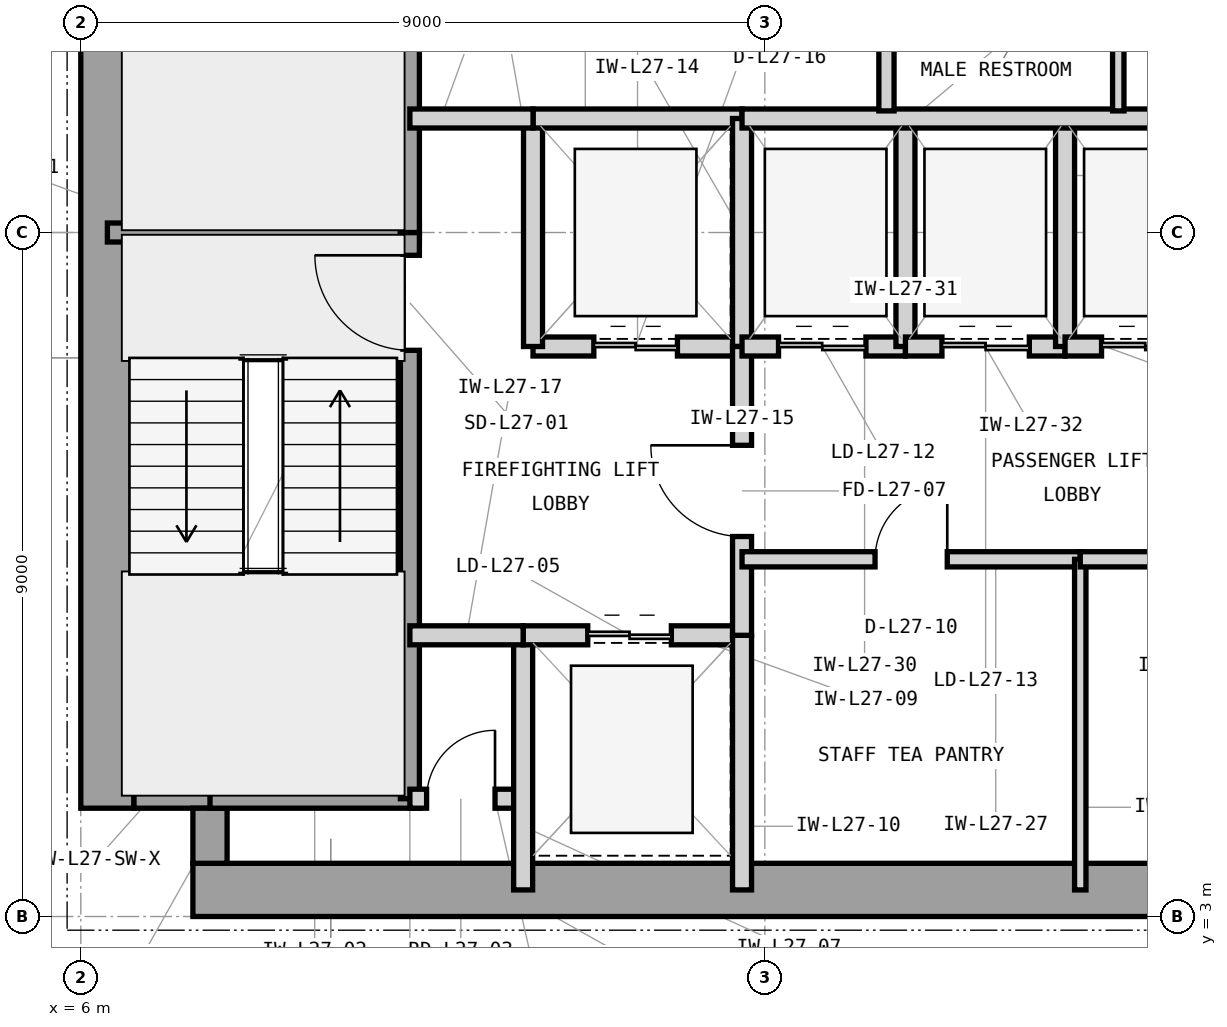
"""IFC4 building model, lengths in metres.
Left out: names, types, materials, properties, quantities, classifications, styles, units other than length and angle.
Written with IfcOpenShell. Run it as: python <this file> out.ifc"""

import sys

from ifc_helpers import new_model, si_unit, direction, frame, frame_2d, origin, place, context, subcontext, project, spatial, rectangle, extrude, element, fill, save


model = new_model("IFC4")
c1 = context("Model", 3, precision=1e-05, world=origin(), true_north=direction((0.0, 1.0)))
c2 = subcontext(c1, "Body", "Model", "MODEL_VIEW")
j1 = project(units=[si_unit("LENGTHUNIT", "METRE"), si_unit("PLANEANGLEUNIT", "RADIAN")], contexts=[c1])
p1 = place(None, origin())
s1 = spatial("IfcSite", under=j1, at=p1, CompositionType="ELEMENT")
p2 = place(p1, origin())
s2 = spatial("IfcBuilding", under=s1, at=p2, CompositionType="ELEMENT")
p3 = place(p2, frame((0.0, 0.0, 116.7)))
s3 = spatial("IfcBuildingStorey", under=s2, at=p3, CompositionType="ELEMENT", Elevation=116.7)
p4 = place(p3, frame((7.475, 3.35, 0.0), z_axis=(0.0, 0.0, 1.0), x_axis=(1.0, 0.0, 0.0)))
e1 = element("IfcWall", 1, at=p4, inside=s3, PredefinedType="SHEAR", context=c2, shape_type="SweptSolid", body=[
    extrude(rectangle(XDim=16.525, YDim=0.7, at=frame_2d((8.262, 0.0))), origin(), (0.0, 0.0, 1.0), 3.9),
])
p5 = place(p3, frame((6.35, 4.425, 0.0), z_axis=(0.0, 0.0, 1.0), x_axis=(0.0, 1.0, 0.0)))
e2 = element("IfcWall", 2, at=p5, inside=s3, PredefinedType="SHEAR", context=c2, shape_type="SweptSolid", body=[
    extrude(rectangle(XDim=15.15, YDim=0.7, at=frame_2d((7.575, 0.0))), origin(), (0.0, 0.0, 1.0), 3.9),
])
p6 = place(p3, frame((6.7, 4.65, 0.0), z_axis=(0.0, 0.0, 1.0), x_axis=(1.0, 0.0, 0.0)))
e3 = element("IfcWall", 3, at=p6, inside=s3, PredefinedType="SHEAR", context=c2, shape_type="SweptSolid", body=[
    extrude(rectangle(XDim=1.225, YDim=0.45, at=frame_2d((0.613, 0.0))), origin(), (0.0, 0.0, 1.0), 3.9),
])
p7 = place(p3, frame((7.7, 3.7, 0.0), z_axis=(0.0, 0.0, 1.0), x_axis=(0.0, 1.0, 0.0)))
e4 = element("IfcWall", 4, at=p7, inside=s3, PredefinedType="SHEAR", context=c2, shape_type="SweptSolid", body=[
    extrude(rectangle(XDim=0.725, YDim=0.45, at=frame_2d((0.363, 0.0))), origin(), (0.0, 0.0, 1.0), 3.9),
])
p8 = place(p3, frame((6.35, 12.0, 0.0), z_axis=(0.0, 0.0, 1.0), x_axis=(1.0, 0.0, 0.0)))
e5 = element("IfcWall", 5, at=p8, inside=s3, PredefinedType="SHEAR", context=c2, shape_type="SweptSolid", body=[
    extrude(rectangle(XDim=4.105, YDim=0.25, at=frame_2d((2.052, 0.0))), origin(), (0.0, 0.0, 1.0), 3.9),
])
p9 = place(p3, frame((7.7, 4.55, 0.0), z_axis=(0.0, 0.0, 1.0), x_axis=(1.0, 0.0, 0.0)))
e6 = element("IfcWall", 6, at=p9, inside=s3, PredefinedType="SHEAR", context=c2, shape_type="SweptSolid", body=[
    extrude(rectangle(XDim=2.755, YDim=0.25, at=frame_2d((1.377, 0.0))), origin(), (0.0, 0.0, 1.0), 3.9),
])
p10 = place(p3, frame((10.33, 4.55, 0.0), z_axis=(0.0, 0.0, 1.0), x_axis=(0.0, 1.0, 0.0)))
e7 = element("IfcWall", 7, at=p10, inside=s3, PredefinedType="SHEAR", context=c2, shape_type="SweptSolid", body=[
    extrude(rectangle(XDim=7.45, YDim=0.25, at=frame_2d((3.725, 0.0))), origin(), (0.0, 0.0, 1.0), 3.9),
])
p11 = place(p10, frame((5.9, 0.0, 0.0)))
e8 = element("IfcOpeningElement", 8, at=p11, cuts=e7, PredefinedType="OPENING", context=c2, shape_type="SweptSolid", body=[
    extrude(rectangle(XDim=1.25, YDim=2.2, at=frame_2d((0.625, 1.1))), frame((0.0, 0.135, 0.0), z_axis=(0.0, -1.0, 0.0), x_axis=(1.0, 0.0, 0.0)), (0.0, 0.0, 1.0), 0.27),
])
p12 = place(p3, frame((10.33, 12.0, 0.0), z_axis=(0.0, 0.0, 1.0), x_axis=(0.0, 1.0, 0.0)))
e9 = element("IfcWall", 9, at=p12, inside=s3, PredefinedType="SHEAR", context=c2, shape_type="SweptSolid", body=[
    extrude(rectangle(XDim=7.45, YDim=0.25, at=frame_2d((3.725, 0.0))), origin(), (0.0, 0.0, 1.0), 3.9),
])
p13 = place(p12, frame((5.85, 0.0, 0.0)))
e10 = element("IfcOpeningElement", 10, at=p13, cuts=e9, PredefinedType="OPENING", context=c2, shape_type="SweptSolid", body=[
    extrude(rectangle(XDim=1.25, YDim=2.2, at=frame_2d((0.625, 1.1))), frame((0.0, 0.135, 0.0), z_axis=(0.0, -1.0, 0.0), x_axis=(1.0, 0.0, 0.0)), (0.0, 0.0, 1.0), 0.27),
])
p14 = place(p3, frame((10.33, 4.55, 0.0), z_axis=(0.0, 0.0, 1.0), x_axis=(1.0, 0.0, 0.0)))
e11 = element("IfcWall", 11, at=p14, inside=s3, PredefinedType="PARTITIONING", context=c2, shape_type="SweptSolid", body=[
    extrude(rectangle(XDim=1.49, YDim=0.25, at=frame_2d((0.745, 0.0))), origin(), (0.0, 0.0, 1.0), 3.69),
])
p15 = place(p14, frame((0.22, 0.0, 0.0)))
e12 = element("IfcOpeningElement", 12, at=p15, cuts=e11, PredefinedType="OPENING", context=c2, shape_type="SweptSolid", body=[
    extrude(rectangle(XDim=0.9, YDim=2.1, at=frame_2d((0.45, 1.05))), frame((0.0, 0.135, 0.0), z_axis=(0.0, -1.0, 0.0), x_axis=(1.0, 0.0, 0.0)), (0.0, 0.0, 1.0), 0.27),
])
p16 = place(p3, frame((11.82, 3.35, 0.0), z_axis=(0.0, 0.0, 1.0), x_axis=(0.0, 1.0, 0.0)))
e13 = element("IfcWall", 13, at=p16, inside=s3, PredefinedType="PARTITIONING", context=c2, shape_type="SweptSolid", body=[
    extrude(rectangle(XDim=3.35, YDim=0.25, at=frame_2d((1.675, 0.0))), origin(), (0.0, 0.0, 1.0), 3.69),
])
p17 = place(p3, frame((11.82, 6.7, 0.0), z_axis=(0.0, 0.0, 1.0), x_axis=(1.0, 0.0, 0.0)))
e14 = element("IfcWall", 14, at=p17, inside=s3, PredefinedType="PARTITIONING", context=c2, shape_type="SweptSolid", body=[
    extrude(rectangle(XDim=2.88, YDim=0.25, at=frame_2d((1.44, 0.0))), origin(), (0.0, 0.0, 1.0), 3.227),
])
p18 = place(p17, frame((0.85, 0.0, 0.0)))
e15 = element("IfcOpeningElement", 15, at=p18, cuts=e14, PredefinedType="OPENING", context=c2, shape_type="SweptSolid", body=[
    extrude(rectangle(XDim=1.1, YDim=2.25, at=frame_2d((0.55, 1.125))), frame((0.0, 0.135, 0.0), z_axis=(0.0, -1.0, 0.0), x_axis=(1.0, 0.0, 0.0)), (0.0, 0.0, 1.0), 0.27),
])
p19 = place(p3, frame((14.7, 3.35, 0.0), z_axis=(0.0, 0.0, 1.0), x_axis=(0.0, 1.0, 0.0)))
e16 = element("IfcWall", 16, at=p19, inside=s3, PredefinedType="PARTITIONING", context=c2, shape_type="SweptSolid", body=[
    extrude(rectangle(XDim=3.35, YDim=0.25, at=frame_2d((1.675, 0.0))), origin(), (0.0, 0.0, 1.0), 3.69),
])
p20 = place(p3, frame((11.95, 10.5, 0.0), z_axis=(0.0, 0.0, 1.0), x_axis=(1.0, 0.0, 0.0)))
e17 = element("IfcWall", 17, at=p20, inside=s3, PredefinedType="PARTITIONING", context=c2, shape_type="SweptSolid", body=[
    extrude(rectangle(XDim=2.75, YDim=0.25, at=frame_2d((1.375, 0.0))), origin(), (0.0, 0.0, 1.0), 3.227),
])
p21 = place(p20, frame((0.8, 0.0, 0.0)))
e18 = element("IfcOpeningElement", 18, at=p21, cuts=e17, PredefinedType="OPENING", context=c2, shape_type="SweptSolid", body=[
    extrude(rectangle(XDim=1.1, YDim=2.25, at=frame_2d((0.55, 1.125))), frame((0.0, 0.135, 0.0), z_axis=(0.0, -1.0, 0.0), x_axis=(1.0, 0.0, 0.0)), (0.0, 0.0, 1.0), 0.27),
])
p22 = place(p3, frame((11.95, 10.5, 0.0), z_axis=(0.0, 0.0, 1.0), x_axis=(0.0, 1.0, 0.0)))
e19 = element("IfcWall", 19, at=p22, inside=s3, PredefinedType="PARTITIONING", context=c2, shape_type="SweptSolid", body=[
    extrude(rectangle(XDim=3.0, YDim=0.25, at=frame_2d((1.5, 0.0))), origin(), (0.0, 0.0, 1.0), 3.69),
])
p23 = place(p3, frame((11.95, 13.5, 0.0), z_axis=(0.0, 0.0, 1.0), x_axis=(1.0, 0.0, 0.0)))
e20 = element("IfcWall", 20, at=p23, inside=s3, PredefinedType="PARTITIONING", context=c2, shape_type="SweptSolid", body=[
    extrude(rectangle(XDim=2.75, YDim=0.25, at=frame_2d((1.375, 0.0))), origin(), (0.0, 0.0, 1.0), 3.227),
])
p24 = place(p3, frame((14.7, 10.5, 0.0), z_axis=(0.0, 0.0, 1.0), x_axis=(0.0, 1.0, 0.0)))
e21 = element("IfcWall", 21, at=p24, inside=s3, PredefinedType="PARTITIONING", context=c2, shape_type="SweptSolid", body=[
    extrude(rectangle(XDim=3.0, YDim=0.25, at=frame_2d((1.5, 0.0))), origin(), (0.0, 0.0, 1.0), 3.69),
])
p25 = place(p3, frame((14.7, 6.7, 0.0), z_axis=(0.0, 0.0, 1.0), x_axis=(0.0, 1.0, 0.0)))
e22 = element("IfcWall", 22, at=p25, inside=s3, PredefinedType="PARTITIONING", context=c2, shape_type="SweptSolid", body=[
    extrude(rectangle(XDim=3.8, YDim=0.25, at=frame_2d((1.9, 0.0))), origin(), (0.0, 0.0, 1.0), 3.69),
])
p26 = place(p25, frame((1.3, 0.0, 0.0)))
e23 = element("IfcOpeningElement", 23, at=p26, cuts=e22, PredefinedType="OPENING", context=c2, shape_type="SweptSolid", body=[
    extrude(rectangle(XDim=1.2, YDim=2.2, at=frame_2d((0.6, 1.1))), frame((0.0, 0.135, 0.0), z_axis=(0.0, -1.0, 0.0), x_axis=(1.0, 0.0, 0.0)), (0.0, 0.0, 1.0), 0.27),
])
p27 = place(p3, frame((10.33, 13.5, 0.0), z_axis=(0.0, 0.0, 1.0), x_axis=(1.0, 0.0, 0.0)))
e24 = element("IfcWall", 24, at=p27, inside=s3, PredefinedType="PARTITIONING", context=c2, shape_type="SweptSolid", body=[
    extrude(rectangle(XDim=1.62, YDim=0.25, at=frame_2d((0.81, 0.0))), origin(), (0.0, 0.0, 1.0), 3.227),
])
p28 = place(p3, frame((10.33, 6.7, 0.0), z_axis=(0.0, 0.0, 1.0), x_axis=(1.0, 0.0, 0.0)))
e25 = element("IfcWall", 25, at=p28, inside=s3, PredefinedType="PARTITIONING", context=c2, shape_type="SweptSolid", body=[
    extrude(rectangle(XDim=1.49, YDim=0.25, at=frame_2d((0.745, 0.0))), origin(), (0.0, 0.0, 1.0), 3.227),
])
p29 = place(p3, frame((14.7, 7.7, 0.0), z_axis=(0.0, 0.0, 1.0), x_axis=(1.0, 0.0, 0.0)))
e26 = element("IfcWall", 26, at=p29, inside=s3, PredefinedType="PARTITIONING", context=c2, shape_type="SweptSolid", body=[
    extrude(rectangle(XDim=4.45, YDim=0.2, at=frame_2d((2.225, 0.0))), origin(), (0.0, 0.0, 1.0), 3.69),
])
p30 = place(p29, frame((1.75, 0.0, 0.0)))
e27 = element("IfcOpeningElement", 27, at=p30, cuts=e26, PredefinedType="OPENING", context=c2, shape_type="SweptSolid", body=[
    extrude(rectangle(XDim=0.95, YDim=2.1, at=frame_2d((0.475, 1.05))), frame((0.0, 0.11, 0.0), z_axis=(0.0, -1.0, 0.0), x_axis=(1.0, 0.0, 0.0)), (0.0, 0.0, 1.0), 0.22),
])
p31 = place(p3, frame((19.15, 3.35, 0.0), z_axis=(0.0, 0.0, 1.0), x_axis=(0.0, 1.0, 0.0)))
e28 = element("IfcWall", 28, at=p31, inside=s3, PredefinedType="PARTITIONING", context=c2, shape_type="SweptSolid", body=[
    extrude(rectangle(XDim=4.35, YDim=0.15, at=frame_2d((2.175, 0.0))), origin(), (0.0, 0.0, 1.0), 3.69),
])
p32 = place(p3, frame((19.15, 7.7, 0.0), z_axis=(0.0, 0.0, 1.0), x_axis=(1.0, 0.0, 0.0)))
e29 = element("IfcWall", 29, at=p32, inside=s3, PredefinedType="PARTITIONING", context=c2, shape_type="SweptSolid", body=[
    extrude(rectangle(XDim=4.5, YDim=0.2, at=frame_2d((2.25, 0.0))), origin(), (0.0, 0.0, 1.0), 3.69),
])
p33 = place(p32, frame((1.75, 0.0, 0.0)))
e30 = element("IfcOpeningElement", 30, at=p33, cuts=e29, PredefinedType="OPENING", context=c2, shape_type="SweptSolid", body=[
    extrude(rectangle(XDim=1.0, YDim=2.15, at=frame_2d((0.5, 1.075))), frame((0.0, 0.11, 0.0), z_axis=(0.0, -1.0, 0.0), x_axis=(1.0, 0.0, 0.0)), (0.0, 0.0, 1.0), 0.22),
])
p34 = place(p3, frame((14.7, 10.5, 0.0), z_axis=(0.0, 0.0, 1.0), x_axis=(1.0, 0.0, 0.0)))
e31 = element("IfcWall", 31, at=p34, inside=s3, PredefinedType="PARTITIONING", context=c2, shape_type="SweptSolid", body=[
    extrude(rectangle(XDim=2.15, YDim=0.25, at=frame_2d((1.075, 0.0))), origin(), (0.0, 0.0, 1.0), 3.227),
])
p35 = place(p34, frame((0.48, 0.0, 0.0)))
e32 = element("IfcOpeningElement", 32, at=p35, cuts=e31, PredefinedType="OPENING", context=c2, shape_type="SweptSolid", body=[
    extrude(rectangle(XDim=1.15, YDim=2.25, at=frame_2d((0.575, 1.125))), frame((0.0, 0.135, 0.0), z_axis=(0.0, -1.0, 0.0), x_axis=(1.0, 0.0, 0.0)), (0.0, 0.0, 1.0), 0.27),
])
p36 = place(p3, frame((16.85, 10.5, 0.0), z_axis=(0.0, 0.0, 1.0), x_axis=(0.0, 1.0, 0.0)))
e33 = element("IfcWall", 33, at=p36, inside=s3, PredefinedType="PARTITIONING", context=c2, shape_type="SweptSolid", body=[
    extrude(rectangle(XDim=3.0, YDim=0.25, at=frame_2d((1.5, 0.0))), origin(), (0.0, 0.0, 1.0), 3.69),
])
p37 = place(p3, frame((16.85, 10.5, 0.0), z_axis=(0.0, 0.0, 1.0), x_axis=(1.0, 0.0, 0.0)))
e34 = element("IfcWall", 34, at=p37, inside=s3, PredefinedType="PARTITIONING", context=c2, shape_type="SweptSolid", body=[
    extrude(rectangle(XDim=2.1, YDim=0.25, at=frame_2d((1.05, 0.0))), origin(), (0.0, 0.0, 1.0), 3.227),
])
p38 = place(p37, frame((0.48, 0.0, 0.0)))
e35 = element("IfcOpeningElement", 35, at=p38, cuts=e34, PredefinedType="OPENING", context=c2, shape_type="SweptSolid", body=[
    extrude(rectangle(XDim=1.15, YDim=2.25, at=frame_2d((0.575, 1.125))), frame((0.0, 0.135, 0.0), z_axis=(0.0, -1.0, 0.0), x_axis=(1.0, 0.0, 0.0)), (0.0, 0.0, 1.0), 0.27),
])
p39 = place(p3, frame((18.95, 10.5, 0.0), z_axis=(0.0, 0.0, 1.0), x_axis=(0.0, 1.0, 0.0)))
e36 = element("IfcWall", 36, at=p39, inside=s3, PredefinedType="PARTITIONING", context=c2, shape_type="SweptSolid", body=[
    extrude(rectangle(XDim=3.0, YDim=0.25, at=frame_2d((1.5, 0.0))), origin(), (0.0, 0.0, 1.0), 3.69),
])
p40 = place(p3, frame((18.95, 10.5, 0.0), z_axis=(0.0, 0.0, 1.0), x_axis=(1.0, 0.0, 0.0)))
e37 = element("IfcWall", 37, at=p40, inside=s3, PredefinedType="PARTITIONING", context=c2, shape_type="SweptSolid", body=[
    extrude(rectangle(XDim=2.1, YDim=0.25, at=frame_2d((1.05, 0.0))), origin(), (0.0, 0.0, 1.0), 3.227),
])
p41 = place(p40, frame((0.48, 0.0, 0.0)))
e38 = element("IfcOpeningElement", 38, at=p41, cuts=e37, PredefinedType="OPENING", context=c2, shape_type="SweptSolid", body=[
    extrude(rectangle(XDim=1.15, YDim=2.25, at=frame_2d((0.575, 1.125))), frame((0.0, 0.135, 0.0), z_axis=(0.0, -1.0, 0.0), x_axis=(1.0, 0.0, 0.0)), (0.0, 0.0, 1.0), 0.27),
])
p42 = place(p3, frame((14.7, 13.5, 0.0), z_axis=(0.0, 0.0, 1.0), x_axis=(1.0, 0.0, 0.0)))
e39 = element("IfcWall", 39, at=p42, inside=s3, PredefinedType="PARTITIONING", context=c2, shape_type="SweptSolid", body=[
    extrude(rectangle(XDim=8.95, YDim=0.25, at=frame_2d((4.475, 0.0))), origin(), (0.0, 0.0, 1.0), 3.227),
])
p43 = place(p3, frame((16.6, 13.6, 0.0), z_axis=(0.0, 0.0, 1.0), x_axis=(0.0, 1.0, 0.0)))
e40 = element("IfcWall", 40, at=p43, inside=s3, PredefinedType="PARTITIONING", context=c2, shape_type="SweptSolid", body=[
    extrude(rectangle(XDim=3.0, YDim=0.2, at=frame_2d((1.5, 0.0))), origin(), (0.0, 0.0, 1.0), 3.69),
])
p44 = place(p43, frame((1.02, 0.0, 0.0)))
e41 = element("IfcOpeningElement", 41, at=p44, cuts=e40, PredefinedType="OPENING", context=c2, shape_type="SweptSolid", body=[
    extrude(rectangle(XDim=0.95, YDim=2.1, at=frame_2d((0.475, 1.05))), frame((0.0, 0.11, 0.0), z_axis=(0.0, -1.0, 0.0), x_axis=(1.0, 0.0, 0.0)), (0.0, 0.0, 1.0), 0.22),
])
p45 = place(p3, frame((19.65, 13.6, 0.0), z_axis=(0.0, 0.0, 1.0), x_axis=(0.0, 1.0, 0.0)))
e42 = element("IfcWall", 42, at=p45, inside=s3, PredefinedType="PARTITIONING", context=c2, shape_type="SweptSolid", body=[
    extrude(rectangle(XDim=3.0, YDim=0.15, at=frame_2d((1.5, 0.0))), origin(), (0.0, 0.0, 1.0), 3.69),
])
p46 = place(p11, origin())
e43 = element("IfcDoor", 43, at=p46, inside=s3, OperationType="SINGLE_SWING_RIGHT", PredefinedType="DOOR", context=c2, shape_type="SweptSolid", body=[
    extrude(rectangle(XDim=1.25, YDim=2.2, at=frame_2d((0.625, 1.1))), frame((0.0, 0.025, 0.0), z_axis=(0.0, -1.0, 0.0), x_axis=(1.0, 0.0, 0.0)), (0.0, 0.0, 1.0), 0.05),
])
fill(e8, e43)
p47 = place(p15, origin())
e44 = element("IfcDoor", 44, at=p47, inside=s3, OperationType="SINGLE_SWING_RIGHT", PredefinedType="TRAPDOOR", context=c2, shape_type="SweptSolid", body=[
    extrude(rectangle(XDim=0.9, YDim=2.1, at=frame_2d((0.45, 1.05))), frame((0.0, 0.025, 0.0), z_axis=(0.0, -1.0, 0.0), x_axis=(1.0, 0.0, 0.0)), (0.0, 0.0, 1.0), 0.05),
])
fill(e12, e44)
p48 = place(p18, origin())
e45 = element("IfcDoor", 45, at=p48, inside=s3, OperationType="DOUBLE_DOOR_SLIDING", PredefinedType="DOOR", context=c2, shape_type="SweptSolid", body=[
    extrude(rectangle(XDim=1.1, YDim=2.25, at=frame_2d((0.55, 1.125))), frame((0.0, 0.025, 0.0), z_axis=(0.0, -1.0, 0.0), x_axis=(1.0, 0.0, 0.0)), (0.0, 0.0, 1.0), 0.05),
])
fill(e15, e45)
p49 = place(p21, origin())
e46 = element("IfcDoor", 46, at=p49, inside=s3, OperationType="DOUBLE_DOOR_SLIDING", PredefinedType="DOOR", context=c2, shape_type="SweptSolid", body=[
    extrude(rectangle(XDim=1.1, YDim=2.25, at=frame_2d((0.55, 1.125))), frame((0.0, 0.025, 0.0), z_axis=(0.0, -1.0, 0.0), x_axis=(1.0, 0.0, 0.0)), (0.0, 0.0, 1.0), 0.05),
])
fill(e18, e46)
p50 = place(p26, origin())
e47 = element("IfcDoor", 47, at=p50, inside=s3, OperationType="SINGLE_SWING_RIGHT", PredefinedType="DOOR", context=c2, shape_type="SweptSolid", body=[
    extrude(rectangle(XDim=1.2, YDim=2.2, at=frame_2d((0.6, 1.1))), frame((0.0, 0.025, 0.0), z_axis=(0.0, -1.0, 0.0), x_axis=(1.0, 0.0, 0.0)), (0.0, 0.0, 1.0), 0.05),
])
fill(e23, e47)
p51 = place(p30, origin())
e48 = element("IfcDoor", 48, at=p51, inside=s3, OperationType="SINGLE_SWING_RIGHT", PredefinedType="DOOR", context=c2, shape_type="SweptSolid", body=[
    extrude(rectangle(XDim=0.95, YDim=2.1, at=frame_2d((0.475, 1.05))), frame((0.0, 0.025, 0.0), z_axis=(0.0, -1.0, 0.0), x_axis=(1.0, 0.0, 0.0)), (0.0, 0.0, 1.0), 0.05),
])
fill(e27, e48)
p52 = place(p35, origin())
e49 = element("IfcDoor", 49, at=p52, inside=s3, OperationType="DOUBLE_DOOR_SLIDING", PredefinedType="DOOR", context=c2, shape_type="SweptSolid", body=[
    extrude(rectangle(XDim=1.15, YDim=2.25, at=frame_2d((0.575, 1.125))), frame((0.0, 0.025, 0.0), z_axis=(0.0, -1.0, 0.0), x_axis=(1.0, 0.0, 0.0)), (0.0, 0.0, 1.0), 0.05),
])
fill(e32, e49)
p53 = place(p38, origin())
e50 = element("IfcDoor", 50, at=p53, inside=s3, OperationType="DOUBLE_DOOR_SLIDING", PredefinedType="DOOR", context=c2, shape_type="SweptSolid", body=[
    extrude(rectangle(XDim=1.15, YDim=2.25, at=frame_2d((0.575, 1.125))), frame((0.0, 0.025, 0.0), z_axis=(0.0, -1.0, 0.0), x_axis=(1.0, 0.0, 0.0)), (0.0, 0.0, 1.0), 0.05),
])
fill(e35, e50)
p54 = place(p41, origin())
e51 = element("IfcDoor", 51, at=p54, inside=s3, OperationType="DOUBLE_DOOR_SLIDING", PredefinedType="DOOR", context=c2, shape_type="SweptSolid", body=[
    extrude(rectangle(XDim=1.15, YDim=2.25, at=frame_2d((0.575, 1.125))), frame((0.0, 0.025, 0.0), z_axis=(0.0, -1.0, 0.0), x_axis=(1.0, 0.0, 0.0)), (0.0, 0.0, 1.0), 0.05),
])
fill(e38, e51)
save(model, sys.argv[1])
